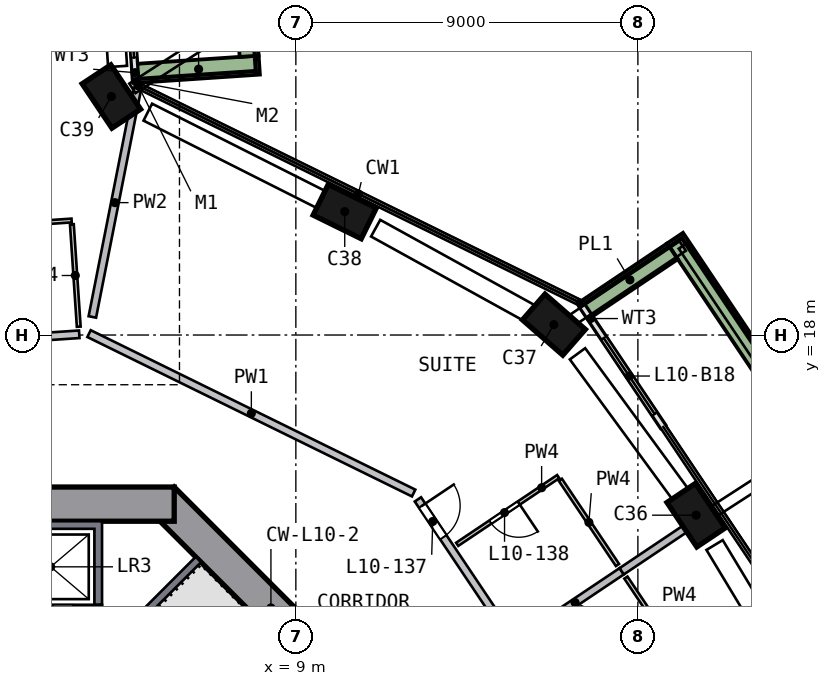
"""IFC4 building model, lengths in metres.
Left out: names, types, materials, properties, quantities, classifications, styles, units other than length and angle.
Written with IfcOpenShell. Run it as: python <this file> out.ifc"""

import sys

from ifc_helpers import new_model, si_unit, direction, frame, frame_2d, origin, origin_2d, place, context, subcontext, project, spatial, polyline, rectangle, outline, extrude, element, fill, save


model = new_model("IFC4")
c1 = context("Model", 3, precision=1e-05, world=origin(), true_north=direction((0.0, 1.0)))
c2 = subcontext(c1, "Body", "Model", "MODEL_VIEW")
j1 = project(units=[si_unit("LENGTHUNIT", "METRE"), si_unit("PLANEANGLEUNIT", "RADIAN")], contexts=[c1])
p1 = place(None, origin())
s1 = spatial("IfcSite", under=j1, at=p1, CompositionType="ELEMENT")
p2 = place(p1, origin())
s2 = spatial("IfcBuilding", under=s1, at=p2, CompositionType="ELEMENT")
p3 = place(p2, frame((0.0, 0.0, 49.5)))
s3 = spatial("IfcBuildingStorey", under=s2, at=p3, CompositionType="ELEMENT", Elevation=49.5)
p4 = place(p3, frame((19.609, 13.147, 0.0), z_axis=(-0.063274346, 0.092706042, 0.993681009), x_axis=(-0.553189961, 0.825459696, -0.112237059)))
e1 = element("IfcColumn", 1, at=p4, inside=s3, PredefinedType="COLUMN", context=c2, shape_type="SweptSolid", body=[
    extrude(rectangle(XDim=1.4, YDim=0.9, at=origin_2d()), origin(), (0.0, 0.0, 1.0), 3.21),
])
p5 = place(p3, frame((15.896, 18.183, 0.0), z_axis=(-0.087127785, 0.07488732, 0.993378396), x_axis=(0.747822899, -0.653882627, 0.114884389)))
e2 = element("IfcColumn", 2, at=p5, inside=s3, PredefinedType="COLUMN", context=c2, shape_type="SweptSolid", body=[
    extrude(rectangle(XDim=1.4, YDim=0.9, at=origin_2d()), origin(), (0.0, 0.0, 1.0), 3.211),
])
p6 = place(p3, frame((10.408, 21.19, 0.0), z_axis=(-0.101222872, 0.048672155, 0.993672457), x_axis=(-0.891838808, 0.438188759, -0.11231274)))
e3 = element("IfcColumn", 3, at=p6, inside=s3, PredefinedType="COLUMN", context=c2, shape_type="SweptSolid", body=[
    extrude(rectangle(XDim=1.4, YDim=0.9, at=origin_2d()), origin(), (0.0, 0.0, 1.0), 3.21),
])
p7 = place(p3, frame((4.285, 24.253, 0.0), z_axis=(-0.115456489, 0.019382097, 0.993123423), x_axis=(0.549525351, -0.831626922, 0.080115864)))
e4 = element("IfcColumn", 4, at=p7, inside=s3, PredefinedType="COLUMN", context=c2, shape_type="SweptSolid", body=[
    extrude(rectangle(XDim=1.4, YDim=0.9, at=origin_2d()), origin(), (0.0, 0.0, 1.0), 3.212),
])
p8 = place(p3, frame((13.682, 5.481, 0.0), z_axis=(0.0, 0.0, 1.0), x_axis=(-0.707106781, 0.707106781, 0.0)))
e5 = element("IfcWall", 5, at=p8, inside=s3, PredefinedType="SHEAR", context=c2, shape_type="SweptSolid", body=[
    extrude(rectangle(XDim=11.598, YDim=0.9, at=frame_2d((5.799, 0.0))), origin(), (0.0, 0.0, 1.0), 3.5),
])
p9 = place(p8, frame((2.099, 0.0, 0.0)))
e6 = element("IfcOpeningElement", 6, at=p9, cuts=e5, PredefinedType="OPENING", context=c2, shape_type="SweptSolid", body=[
    extrude(rectangle(XDim=1.2, YDim=2.1, at=frame_2d((0.6, 1.05))), frame((0.0, 0.46, 0.0), z_axis=(0.0, -1.0, 0.0), x_axis=(1.0, 0.0, 0.0)), (0.0, 0.0, 1.0), 0.92),
])
p10 = place(p3, frame((5.799, 13.55, 0.0), z_axis=(0.0, 0.0, 1.0), x_axis=(-1.0, 0.0, 0.0)))
e7 = element("IfcWall", 7, at=p10, inside=s3, PredefinedType="SHEAR", context=c2, shape_type="SweptSolid", body=[
    extrude(rectangle(XDim=11.598, YDim=0.9, at=frame_2d((5.799, 0.0))), origin(), (0.0, 0.0, 1.0), 3.5),
])
p11 = place(p10, frame((4.899, 0.0, 0.0)))
e8 = element("IfcOpeningElement", 8, at=p11, cuts=e7, PredefinedType="OPENING", context=c2, shape_type="SweptSolid", body=[
    extrude(rectangle(XDim=1.8, YDim=2.1, at=frame_2d((0.9, 1.05))), frame((0.0, 0.46, 0.0), z_axis=(0.0, -1.0, 0.0), x_axis=(1.0, 0.0, 0.0)), (0.0, 0.0, 1.0), 0.92),
])
p12 = place(p3, frame((4.781, 24.704, 0.0), z_axis=(0.0, 0.0, 1.0), x_axis=(-0.066962013, 0.997755526, 0.0)))
e9 = element("IfcWall", 9, at=p12, inside=s3, PredefinedType="SOLIDWALL", context=c2, shape_type="SweptSolid", body=[
    extrude(rectangle(XDim=3.402, YDim=0.15, at=frame_2d((1.701, 0.0))), origin(), (0.0, 0.0, 1.0), 2.425),
])
p13 = place(p12, frame((0.602, 0.0, 0.0)))
e10 = element("IfcOpeningElement", 10, at=p13, cuts=e9, PredefinedType="OPENING", context=c2, shape_type="SweptSolid", body=[
    extrude(rectangle(XDim=2.4, YDim=2.4, at=frame_2d((1.2, 1.2))), frame((0.0, 0.085, 0.0), z_axis=(0.0, -1.0, 0.0), x_axis=(1.0, 0.0, 0.0)), (0.0, 0.0, 1.0), 0.17),
])
p14 = place(p3, frame((18.662, 15.592, 0.0), z_axis=(0.0, 0.0, 1.0), x_axis=(-0.556868957, 0.830600364, 0.0)))
e11 = element("IfcWall", 11, at=p14, inside=s3, PredefinedType="SOLIDWALL", context=c2, shape_type="SweptSolid", body=[
    extrude(rectangle(XDim=3.841, YDim=0.15, at=frame_2d((1.921, 0.0))), origin(), (0.0, 0.0, 1.0), 2.425),
])
p15 = place(p14, frame((0.4, 0.0, 0.0)))
e12 = element("IfcOpeningElement", 12, at=p15, cuts=e11, PredefinedType="OPENING", context=c2, shape_type="SweptSolid", body=[
    extrude(rectangle(XDim=2.4, YDim=2.4, at=frame_2d((1.2, 1.2))), frame((0.0, 0.085, 0.0), z_axis=(0.0, -1.0, 0.0), x_axis=(1.0, 0.0, 0.0)), (0.0, 0.0, 1.0), 0.17),
])
p16 = place(p3, frame((26.622, 9.152, 0.0), z_axis=(0.0, 0.0, 1.0), x_axis=(-0.55686597, 0.830602367, 0.0)))
e13 = element("IfcWall", 13, at=p16, inside=s3, PredefinedType="SOLIDWALL", context=c2, shape_type="SweptSolid", body=[
    extrude(rectangle(XDim=13.723, YDim=0.5, at=frame_2d((6.862, 0.0))), origin(), (0.0, 0.0, 1.0), 0.7),
])
p17 = place(p3, frame((18.911, 20.204, 0.0), z_axis=(0.0, 0.0, 1.0), x_axis=(-0.830600108, -0.556869339, 0.0)))
e14 = element("IfcWall", 14, at=p17, inside=s3, PredefinedType="SOLIDWALL", context=c2, shape_type="SweptSolid", body=[
    extrude(rectangle(XDim=2.699, YDim=0.5, at=frame_2d((1.35, 0.0))), origin(), (0.0, 0.0, 1.0), 0.7),
])
p18 = place(p3, frame((4.845, 24.889, 0.0), z_axis=(0.0, 0.0, 1.0), x_axis=(0.997752622, 0.067005263, 0.0)))
e15 = element("IfcWall", 15, at=p18, inside=s3, PredefinedType="SOLIDWALL", context=c2, shape_type="SweptSolid", body=[
    extrude(rectangle(XDim=3.199, YDim=0.5, at=frame_2d((1.6, 0.0))), origin(), (0.0, 0.0, 1.0), 0.7),
])
p19 = place(p3, frame((7.771, 25.336, 0.0), z_axis=(0.0, 0.0, 1.0), x_axis=(-0.06697871, 0.997754405, 0.0)))
e16 = element("IfcWall", 16, at=p19, inside=s3, PredefinedType="SOLIDWALL", context=c2, shape_type="SweptSolid", body=[
    extrude(rectangle(XDim=16.25, YDim=0.5, at=frame_2d((8.125, 0.0))), origin(), (0.0, 0.0, 1.0), 0.7),
])
p20 = place(p3, origin())
e17 = element("IfcWall", 17, at=p20, inside=s3, PredefinedType="SOLIDWALL", context=c2, shape_type="SweptSolid", body=[
    extrude(outline(polyline([(3.9, 13.1), (3.9, 10.9), (3.7, 10.9), (3.7, 12.9), (1.4, 12.9), (1.4, 10.9), (1.2, 10.9), (1.2, 13.1), (3.9, 13.1)])), origin(), (0.0, 0.0, 1.0), 3.19),
])
p21 = place(p3, frame((1.2, 10.8, 0.0), z_axis=(0.0, 0.0, 1.0), x_axis=(1.0, 0.0, 0.0)))
e18 = element("IfcWall", 18, at=p21, inside=s3, PredefinedType="SOLIDWALL", context=c2, shape_type="SweptSolid", body=[
    extrude(rectangle(XDim=2.7, YDim=0.2, at=frame_2d((1.35, 0.0))), origin(), (0.0, 0.0, 1.0), 3.19),
])
p22 = place(p21, frame((0.75, 0.0, 0.0)))
e19 = element("IfcOpeningElement", 19, at=p22, cuts=e18, PredefinedType="OPENING", context=c2, shape_type="SweptSolid", body=[
    extrude(rectangle(XDim=1.2, YDim=2.1, at=frame_2d((0.6, 1.05))), frame((0.0, 0.11, 0.0), z_axis=(0.0, -1.0, 0.0), x_axis=(1.0, 0.0, 0.0)), (0.0, 0.0, 1.0), 0.22),
])
p23 = place(p3, frame((3.677, 9.334, 0.0), z_axis=(0.0, 0.0, 1.0), x_axis=(0.707106781, 0.707106781, 0.0)))
e20 = element("IfcWall", 20, at=p23, inside=s3, PredefinedType="SOLIDWALL", context=c2, shape_type="SweptSolid", body=[
    extrude(rectangle(XDim=3.9, YDim=0.2, at=frame_2d((1.95, 0.0))), origin(), (0.0, 0.0, 1.0), 3.19),
])
p24 = place(p3, frame((3.301, 18.02, 0.0), z_axis=(0.0, 0.0, 1.0), x_axis=(-0.997753271, -0.066995596, 0.0)))
e21 = element("IfcWall", 21, at=p24, inside=s3, PredefinedType="SOLIDWALL", context=c2, shape_type="SweptSolid", body=[
    extrude(rectangle(XDim=3.4, YDim=0.2, at=frame_2d((1.7, 0.0))), origin(), (0.0, 0.0, 1.0), 3.19),
])
p25 = place(p3, frame((12.1, 13.842, 0.0), z_axis=(0.0, 0.0, 1.0), x_axis=(-0.897570713, 0.44087052, 0.0)))
e22 = element("IfcWall", 22, at=p25, inside=s3, PredefinedType="SOLIDWALL", context=c2, shape_type="SweptSolid", body=[
    extrude(rectangle(XDim=9.516, YDim=0.2, at=frame_2d((4.758, 0.0))), origin(), (0.0, 0.0, 1.0), 3.19),
])
p26 = place(p3, frame((12.212, 13.675, 0.0), z_axis=(0.0, 0.0, 1.0), x_axis=(0.556867612, -0.830601266, 0.0)))
e23 = element("IfcWall", 23, at=p26, inside=s3, PredefinedType="SOLIDWALL", context=c2, shape_type="SweptSolid", body=[
    extrude(rectangle(XDim=9.116, YDim=0.2, at=frame_2d((4.558, 0.0))), origin(), (0.0, 0.0, 1.0), 3.19),
])
p27 = place(p26, frame((0.2, 0.0, 0.0)))
e24 = element("IfcOpeningElement", 24, at=p27, cuts=e23, PredefinedType="OPENING", context=c2, shape_type="SweptSolid", body=[
    extrude(rectangle(XDim=1.0, YDim=2.1, at=frame_2d((0.5, 1.05))), frame((0.0, 0.11, 0.0), z_axis=(0.0, -1.0, 0.0), x_axis=(1.0, 0.0, 0.0)), (0.0, 0.0, 1.0), 0.22),
])
p28 = place(p3, frame((4.832, 24.492, 0.0), z_axis=(0.0, 0.0, 1.0), x_axis=(-0.193535211, -0.98109333, 0.0)))
e25 = element("IfcWall", 25, at=p28, inside=s3, PredefinedType="SOLIDWALL", context=c2, shape_type="SweptSolid", body=[
    extrude(rectangle(XDim=6.132, YDim=0.2, at=frame_2d((3.066, 0.0))), origin(), (0.0, 0.0, 1.0), 3.19),
])
p29 = place(p3, frame((15.122, 10.138, 0.0), z_axis=(0.0, 0.0, 1.0), x_axis=(0.830546242, 0.556949675, 0.0)))
e26 = element("IfcWall", 26, at=p29, inside=s3, PredefinedType="SOLIDWALL", context=c2, shape_type="SweptSolid", body=[
    extrude(rectangle(XDim=2.953, YDim=0.2, at=frame_2d((1.476, 0.0))), origin(), (0.0, 0.0, 1.0), 3.19),
])
p30 = place(p3, frame((17.574, 11.783, 0.0), z_axis=(0.0, 0.0, 1.0), x_axis=(0.830647114, 0.556799221, 0.0)))
e27 = element("IfcWall", 27, at=p30, inside=s3, PredefinedType="SOLIDWALL", context=c2, shape_type="SweptSolid", body=[
    extrude(rectangle(XDim=2.95, YDim=0.2, at=frame_2d((1.475, 0.0))), origin(), (0.0, 0.0, 1.0), 3.19),
])
p31 = place(p3, frame((3.1, 21.013, 0.0), z_axis=(0.0, 0.0, 1.0), x_axis=(-0.99775365, -0.06698996, 0.0)))
e28 = element("IfcWall", 28, at=p31, inside=s3, PredefinedType="PARTITIONING", context=c2, shape_type="SweptSolid", body=[
    extrude(rectangle(XDim=3.2, YDim=0.1, at=frame_2d((1.6, 0.0))), origin(), (0.0, 0.0, 1.0), 3.19),
])
p32 = place(p31, frame((1.25, 0.0, 0.0)))
e29 = element("IfcOpeningElement", 29, at=p32, cuts=e28, PredefinedType="OPENING", context=c2, shape_type="SweptSolid", body=[
    extrude(rectangle(XDim=0.9, YDim=2.1, at=frame_2d((0.45, 1.05))), frame((0.0, 0.06, 0.0), z_axis=(0.0, -1.0, 0.0), x_axis=(1.0, 0.0, 0.0)), (0.0, 0.0, 1.0), 0.12),
])
p33 = place(p3, frame((3.287, 18.219, 0.0), z_axis=(0.0, 0.0, 1.0), x_axis=(-0.066915118, 0.997758672, 0.0)))
e30 = element("IfcWall", 30, at=p33, inside=s3, PredefinedType="PARTITIONING", context=c2, shape_type="SweptSolid", body=[
    extrude(rectangle(XDim=2.7, YDim=0.1, at=frame_2d((1.35, 0.0))), origin(), (0.0, 0.0, 1.0), 3.19),
])
p34 = place(p3, frame((15.903, 14.274, 0.0), z_axis=(0.0, 0.0, 1.0), x_axis=(-0.830544822, -0.556951792, 0.0)))
e31 = element("IfcWall", 31, at=p34, inside=s3, PredefinedType="PARTITIONING", context=c2, shape_type="SweptSolid", body=[
    extrude(rectangle(XDim=3.2, YDim=0.1, at=frame_2d((1.6, 0.0))), origin(), (0.0, 0.0, 1.0), 3.19),
])
p35 = place(p34, frame((1.25, 0.0, 0.0)))
e32 = element("IfcOpeningElement", 32, at=p35, cuts=e31, PredefinedType="OPENING", context=c2, shape_type="SweptSolid", body=[
    extrude(rectangle(XDim=0.9, YDim=2.1, at=frame_2d((0.45, 1.05))), frame((0.0, 0.06, 0.0), z_axis=(0.0, -1.0, 0.0), x_axis=(1.0, 0.0, 0.0)), (0.0, 0.0, 1.0), 0.12),
])
for number, where, z_axis, x_axis in (
    (33, (15.959, 14.191, 0.0), (0.0, 0.0, 1.0), (0.557, -0.831, 0.0)),
    (34, (19.189, 9.374, 0.0), (0.0, 0.0, 1.0), (-0.557, 0.831, 0.0)),
):
    element("IfcWall", number, at=place(p3, frame(where, z_axis=z_axis, x_axis=x_axis)), inside=s3, PredefinedType="PARTITIONING", context=c2, shape_type="SweptSolid", body=[
        extrude(rectangle(XDim=2.7, YDim=0.1, at=frame_2d((1.35, 0.0))), origin(), (0.0, 0.0, 1.0), 3.19),
    ])
p36 = place(p13, origin())
e35 = element("IfcDoor", 35, at=p36, inside=s3, OperationType="SLIDING_TO_LEFT", PredefinedType="DOOR", context=c2, shape_type="SweptSolid", body=[
    extrude(rectangle(XDim=2.4, YDim=2.4, at=frame_2d((1.2, 1.2))), frame((0.0, 0.025, 0.0), z_axis=(0.0, -1.0, 0.0), x_axis=(1.0, 0.0, 0.0)), (0.0, 0.0, 1.0), 0.05),
])
fill(e10, e35)
p37 = place(p15, origin())
e36 = element("IfcDoor", 36, at=p37, inside=s3, OperationType="SLIDING_TO_RIGHT", PredefinedType="DOOR", context=c2, shape_type="SweptSolid", body=[
    extrude(rectangle(XDim=2.4, YDim=2.4, at=frame_2d((1.2, 1.2))), frame((0.0, 0.025, 0.0), z_axis=(0.0, -1.0, 0.0), x_axis=(1.0, 0.0, 0.0)), (0.0, 0.0, 1.0), 0.05),
])
fill(e12, e36)
p38 = place(p27, origin())
e37 = element("IfcDoor", 37, at=p38, inside=s3, OperationType="SINGLE_SWING_LEFT", PredefinedType="DOOR", context=c2, shape_type="SweptSolid", body=[
    extrude(rectangle(XDim=1.0, YDim=2.1, at=frame_2d((0.5, 1.05))), frame((0.0, 0.025, 0.0), z_axis=(0.0, -1.0, 0.0), x_axis=(1.0, 0.0, 0.0)), (0.0, 0.0, 1.0), 0.05),
])
fill(e24, e37)
p39 = place(p35, origin())
e38 = element("IfcDoor", 38, at=p39, inside=s3, OperationType="SINGLE_SWING_LEFT", PredefinedType="DOOR", context=c2, shape_type="SweptSolid", body=[
    extrude(rectangle(XDim=0.9, YDim=2.1, at=frame_2d((0.45, 1.05))), frame((0.0, 0.025, 0.0), z_axis=(0.0, -1.0, 0.0), x_axis=(1.0, 0.0, 0.0)), (0.0, 0.0, 1.0), 0.05),
])
fill(e32, e38)
save(model, sys.argv[1])
